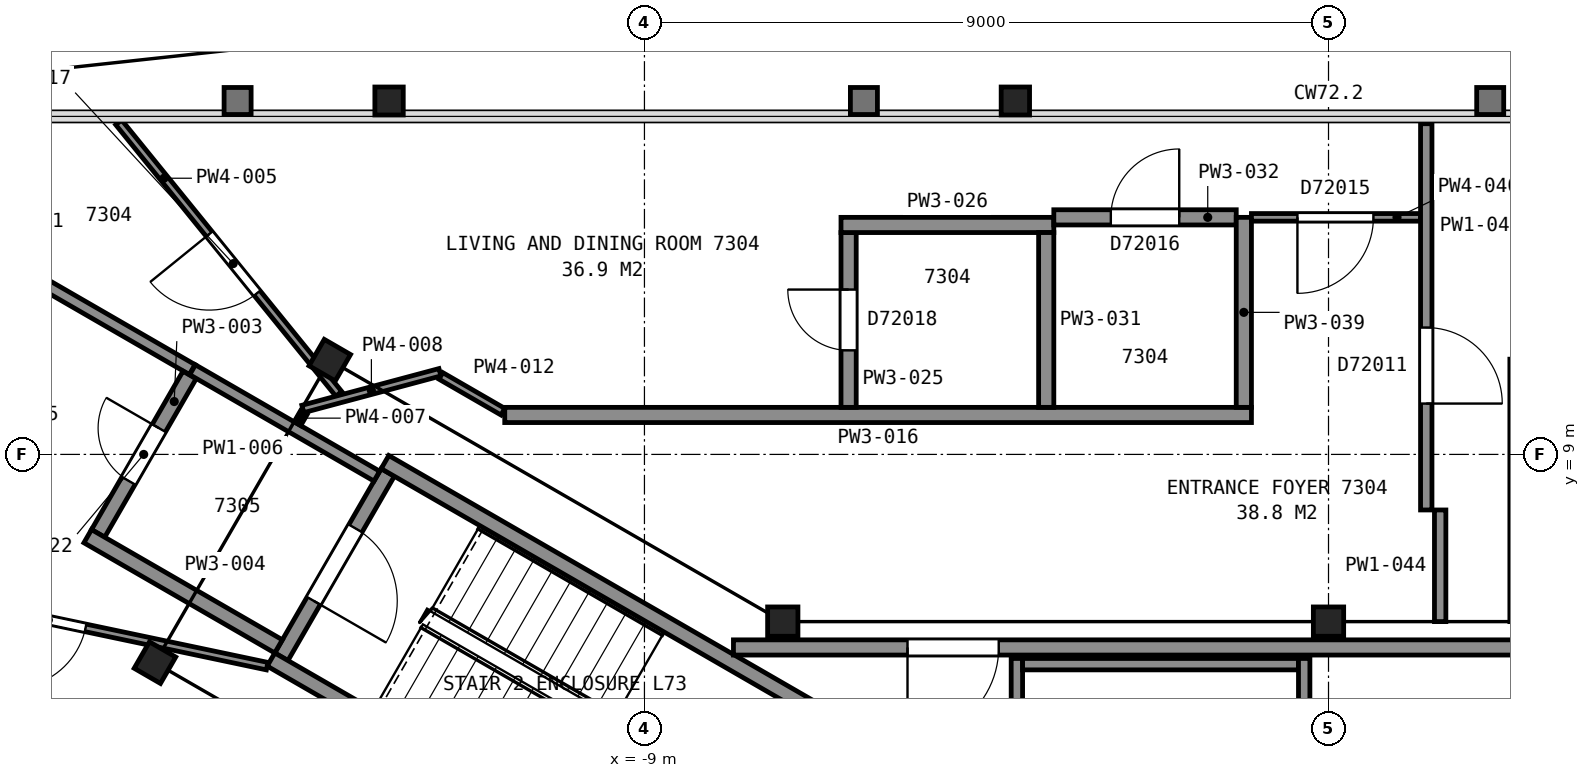
"""IFC4 building model, lengths in metres.
Left out: names, types, materials, properties, quantities, classifications, styles, units other than length and angle.
Written with IfcOpenShell. Run it as: python <this file> out.ifc"""

import sys

from ifc_helpers import new_model, si_unit, direction, frame, frame_2d, origin, origin_2d, place, context, subcontext, project, spatial, rectangle, i_section, extrude, element, fill, save


model = new_model("IFC4")
c1 = context("Model", 3, precision=1e-05, world=origin(), true_north=direction((0.0, 1.0)))
c2 = subcontext(c1, "Body", "Model", "MODEL_VIEW")
j1 = project(units=[si_unit("LENGTHUNIT", "METRE"), si_unit("PLANEANGLEUNIT", "RADIAN")], contexts=[c1])
p1 = place(None, origin())
s1 = spatial("IfcSite", under=j1, at=p1, CompositionType="ELEMENT")
p2 = place(p1, origin())
s2 = spatial("IfcBuilding", under=s1, at=p2, CompositionType="ELEMENT")
p3 = place(p2, frame((0.0, 0.0, 289.9)))
s3 = spatial("IfcBuildingStorey", under=s2, at=p3, CompositionType="ELEMENT", Elevation=289.9)
for number, where, z_axis, x_axis in (
    (1, (-4.12, 13.65, 0.0), (0.0, 0.0, 1.0), (1.0, 0.0, 0.0)),
    (2, (-12.36, 13.65, 0.0), (0.0, 0.0, 1.0), (1.0, 0.0, 0.0)),
):
    element("IfcColumn", number, at=place(p3, frame(where, z_axis=z_axis, x_axis=x_axis)), inside=s3, PredefinedType="COLUMN", context=c2, shape_type="SweptSolid", body=[
        extrude(i_section(OverallWidth=0.373, OverallDepth=0.368, WebThickness=0.015, FlangeThickness=0.024, FilletRadius=0.015, at=origin_2d()), origin(), (0.0, 0.0, 1.0), 3.7),
    ])
for number, where, z_axis, x_axis in (
    (3, (0.0, 6.8, 0.0), (0.0, 0.0, 1.0), (1.0, 0.0, 0.0)),
    (4, (-7.18, 6.8, 0.0), (0.0, 0.0, 1.0), (1.0, 0.0, 0.0)),
):
    element("IfcColumn", number, at=place(p3, frame(where, z_axis=z_axis, x_axis=x_axis)), inside=s3, PredefinedType="COLUMN", context=c2, shape_type="SweptSolid", body=[
        extrude(i_section(OverallWidth=0.399, OverallDepth=0.386, WebThickness=0.021, FlangeThickness=0.033, FilletRadius=0.015, at=origin_2d()), origin(), (0.0, 0.0, 1.0), 3.7),
    ])
for number, where, z_axis, x_axis in (
    (5, (-13.14, 10.24, 0.0), (0.0, 0.0, 1.0), (0.5, 0.866, 0.0)),
    (6, (-15.44, 6.26, 0.0), (0.0, 0.0, 1.0), (0.5, 0.866, 0.0)),
):
    element("IfcColumn", number, at=place(p3, frame(where, z_axis=z_axis, x_axis=x_axis)), inside=s3, PredefinedType="COLUMN", context=c2, shape_type="SweptSolid", body=[
        extrude(i_section(OverallWidth=0.401, OverallDepth=0.399, WebThickness=0.025, FlangeThickness=0.04, FilletRadius=0.015, at=origin_2d()), origin(), (0.0, 0.0, 1.0), 3.7),
    ])
p4 = place(p3, frame((-12.377, 8.762, 0.0), z_axis=(0.0, 0.0, 1.0), x_axis=(-0.500049511043, -0.865996816683, 0.0)))
e7 = element("IfcWall", 7, at=p4, inside=s3, PredefinedType="PARTITIONING", context=c2, shape_type="SweptSolid", body=[
    extrude(rectangle(XDim=2.8, YDim=0.2, at=frame_2d((1.4, 0.0))), origin(), (0.0, 0.0, 1.0), 3.45),
])
p5 = place(p4, frame((0.85, 0.0, 0.0)))
e8 = element("IfcOpeningElement", 8, at=p5, cuts=e7, PredefinedType="OPENING", context=c2, shape_type="SweptSolid", body=[
    extrude(rectangle(XDim=1.1, YDim=2.1, at=frame_2d((0.55, 1.05))), frame((0.0, 0.11, 0.0), z_axis=(0.0, -1.0, 0.0), x_axis=(1.0, 0.0, 0.0)), (0.0, 0.0, 1.0), 0.22),
])
for number, where, z_axis, x_axis in (
    (9, (-7.678, 2.701, 0.0), (0.0, 0.0, 1.0), (-0.866, 0.5, 0.0)),
    (10, (-6.178, 5.299, 0.0), (0.0, 0.0, 1.0), (-0.866, 0.5, 0.0)),
):
    element("IfcWall", number, at=place(p3, frame(where, z_axis=z_axis, x_axis=x_axis)), inside=s3, PredefinedType="PARTITIONING", context=c2, shape_type="SweptSolid", body=[
        extrude(rectangle(XDim=7.2, YDim=0.2, at=frame_2d((3.6, 0.0))), origin(), (0.0, 0.0, 1.0), 3.45),
    ])
p6 = place(p3, frame((7.829, 6.46, 0.0), z_axis=(0.0, 0.0, 1.0), x_axis=(-1.0, 0.0, 0.0)))
e11 = element("IfcWall", 11, at=p6, inside=s3, PredefinedType="PARTITIONING", context=c2, shape_type="SweptSolid", body=[
    extrude(rectangle(XDim=15.658, YDim=0.2, at=frame_2d((7.829, 0.0))), origin(), (0.0, 0.0, 1.0), 3.45),
])
p7 = place(p6, frame((12.168, 0.0, 0.0)))
e12 = element("IfcOpeningElement", 12, at=p7, cuts=e11, PredefinedType="OPENING", context=c2, shape_type="SweptSolid", body=[
    extrude(rectangle(XDim=1.2, YDim=2.1, at=frame_2d((0.6, 1.05))), frame((0.0, 0.11, 0.0), z_axis=(0.0, -1.0, 0.0), x_axis=(1.0, 0.0, 0.0)), (0.0, 0.0, 1.0), 0.22),
])
p8 = place(p3, frame((-4.1, 2.085, 0.0), z_axis=(0.0, 0.0, 1.0), x_axis=(0.0, 1.0, 0.0)))
e13 = element("IfcWall", 13, at=p8, inside=s3, PredefinedType="PARTITIONING", context=c2, shape_type="SweptSolid", body=[
    extrude(rectangle(XDim=4.23, YDim=0.15, at=frame_2d((2.115, 0.0))), origin(), (0.0, 0.0, 1.0), 3.45),
])
p9 = place(p8, frame((1.625, 0.0, 0.0)))
e14 = element("IfcOpeningElement", 14, at=p9, cuts=e13, PredefinedType="OPENING", context=c2, shape_type="SweptSolid", body=[
    extrude(rectangle(XDim=1.0, YDim=2.1, at=frame_2d((0.5, 1.05))), frame((0.0, 0.085, 0.0), z_axis=(0.0, -1.0, 0.0), x_axis=(1.0, 0.0, 0.0)), (0.0, 0.0, 1.0), 0.17),
])
p10 = place(p3, frame((-4.025, 6.24, 0.0), z_axis=(0.0, 0.0, 1.0), x_axis=(1.0, 0.0, 0.0)))
e15 = element("IfcWall", 15, at=p10, inside=s3, PredefinedType="PARTITIONING", context=c2, shape_type="SweptSolid", body=[
    extrude(rectangle(XDim=3.63, YDim=0.15, at=frame_2d((1.815, 0.0))), origin(), (0.0, 0.0, 1.0), 3.45),
])
p11 = place(p3, frame((-0.32, 2.252, 0.0), z_axis=(0.0, 0.0, 1.0), x_axis=(0.0, 1.0, 0.0)))
e16 = element("IfcWall", 16, at=p11, inside=s3, PredefinedType="PARTITIONING", context=c2, shape_type="SweptSolid", body=[
    extrude(rectangle(XDim=4.063, YDim=0.15, at=frame_2d((2.031, 0.0))), origin(), (0.0, 0.0, 1.0), 3.45),
])
p12 = place(p3, frame((-20.506, 13.324, 0.0), z_axis=(0.0, 0.0, 1.0), x_axis=(0.866004971522, -0.500035388047, 0.0)))
e17 = element("IfcWall", 17, at=p12, inside=s3, PredefinedType="PARTITIONING", context=c2, shape_type="SweptSolid", body=[
    extrude(rectangle(XDim=6.416, YDim=0.15, at=frame_2d((3.208, 0.0))), origin(), (0.0, 0.0, 1.0), 2.723),
])
p13 = place(p3, frame((-19.729, 7.428, 0.0), z_axis=(0.0, 0.0, 1.0), x_axis=(0.97852427483, -0.206131617102, 0.0)))
e18 = element("IfcWall", 18, at=p13, inside=s3, PredefinedType="PARTITIONING", context=c2, shape_type="SweptSolid", body=[
    extrude(rectangle(XDim=5.891, YDim=0.1, at=frame_2d((2.946, 0.0))), origin(), (0.0, 0.0, 1.0), 2.723),
])
p14 = place(p13, frame((2.45, 0.0, 0.0)))
e19 = element("IfcOpeningElement", 19, at=p14, cuts=e18, PredefinedType="OPENING", context=c2, shape_type="SweptSolid", body=[
    extrude(rectangle(XDim=1.0, YDim=2.1, at=frame_2d((0.5, 1.05))), frame((0.0, 0.06, 0.0), z_axis=(0.0, -1.0, 0.0), x_axis=(1.0, 0.0, 0.0)), (0.0, 0.0, 1.0), 0.12),
])
p15 = place(p3, frame((-14.985, 10.045, 0.0), z_axis=(0.0, 0.0, 1.0), x_axis=(-0.499903970786, -0.866080839178, 0.0)))
e20 = element("IfcWall", 20, at=p15, inside=s3, PredefinedType="PARTITIONING", context=c2, shape_type="SweptSolid", body=[
    extrude(rectangle(XDim=2.406, YDim=0.2, at=frame_2d((1.203, 0.0))), origin(), (0.0, 0.0, 1.0), 2.723),
])
p16 = place(p15, frame((0.806, 0.0, 0.0)))
e21 = element("IfcOpeningElement", 21, at=p16, cuts=e20, PredefinedType="OPENING", context=c2, shape_type="SweptSolid", body=[
    extrude(rectangle(XDim=0.8, YDim=2.1, at=frame_2d((0.4, 1.05))), frame((0.0, 0.11, 0.0), z_axis=(0.0, -1.0, 0.0), x_axis=(1.0, 0.0, 0.0)), (0.0, 0.0, 1.0), 0.22),
])
p17 = place(p3, frame((-16.325, 7.924, 0.0), z_axis=(0.0, 0.0, 1.0), x_axis=(0.865969617579, -0.500096612097, 0.0)))
e22 = element("IfcWall", 22, at=p17, inside=s3, PredefinedType="PARTITIONING", context=c2, shape_type="SweptSolid", body=[
    extrude(rectangle(XDim=2.899, YDim=0.2, at=frame_2d((1.45, 0.0))), origin(), (0.0, 0.0, 1.0), 2.723),
])
p18 = place(p3, frame((-13.021, 9.797, 0.0), z_axis=(0.0, 0.0, 1.0), x_axis=(-0.629738754572, 0.776806990822, 0.0)))
e23 = element("IfcWall", 23, at=p18, inside=s3, PredefinedType="PARTITIONING", context=c2, shape_type="SweptSolid", body=[
    extrude(rectangle(XDim=4.598, YDim=0.1, at=frame_2d((2.299, 0.0))), origin(), (0.0, 0.0, 1.0), 2.723),
])
p19 = place(p18, frame((1.706, 0.0, 0.0)))
e24 = element("IfcOpeningElement", 24, at=p19, cuts=e23, PredefinedType="OPENING", context=c2, shape_type="SweptSolid", body=[
    extrude(rectangle(XDim=1.0, YDim=2.1, at=frame_2d((0.5, 1.05))), frame((0.0, 0.06, 0.0), z_axis=(0.0, -1.0, 0.0), x_axis=(1.0, 0.0, 0.0)), (0.0, 0.0, 1.0), 0.12),
])
p20 = place(p3, frame((-14.945, 10.114, 0.0), z_axis=(0.0, 0.0, 1.0), x_axis=(0.865969158485, -0.500097407065, 0.0)))
e25 = element("IfcWall", 25, at=p20, inside=s3, PredefinedType="PARTITIONING", context=c2, shape_type="SweptSolid", body=[
    extrude(rectangle(XDim=2.799, YDim=0.15, at=frame_2d((1.4, 0.0))), origin(), (0.0, 0.0, 1.0), 2.723),
])
p21 = place(p3, frame((-13.565, 9.404, 0.0), z_axis=(0.0, 0.0, 1.0), x_axis=(0.500181256421, 0.865920730047, 0.0)))
e26 = element("IfcWall", 26, at=p21, inside=s3, PredefinedType="PARTITIONING", context=c2, shape_type="SweptSolid", body=[
    extrude(rectangle(XDim=0.169, YDim=0.1, at=frame_2d((0.084, 0.0))), origin(), (0.0, 0.0, 1.0), 2.723),
])
p22 = place(p3, frame((-13.494, 9.598, 0.0), z_axis=(0.0, 0.0, 1.0), x_axis=(0.96601104623, 0.258500790254, 0.0)))
e27 = element("IfcWall", 27, at=p22, inside=s3, PredefinedType="PARTITIONING", context=c2, shape_type="SweptSolid", body=[
    extrude(rectangle(XDim=1.867, YDim=0.1, at=frame_2d((0.934, 0.0))), origin(), (0.0, 0.0, 1.0), 2.723),
])
p23 = place(p3, frame((-11.678, 10.033, 0.0), z_axis=(0.0, 0.0, 1.0), x_axis=(0.866116627388, -0.499841962787, 0.0)))
e28 = element("IfcWall", 28, at=p23, inside=s3, PredefinedType="PARTITIONING", context=c2, shape_type="SweptSolid", body=[
    extrude(rectangle(XDim=0.943, YDim=0.1, at=frame_2d((0.472, 0.0))), origin(), (0.0, 0.0, 1.0), 2.723),
])
p24 = place(p3, frame((-10.838, 9.519, 0.0), z_axis=(0.0, 0.0, 1.0), x_axis=(1.0, 0.0, 0.0)))
e29 = element("IfcWall", 29, at=p24, inside=s3, PredefinedType="PARTITIONING", context=c2, shape_type="SweptSolid", body=[
    extrude(rectangle(XDim=9.824, YDim=0.2, at=frame_2d((4.912, 0.0))), origin(), (0.0, 0.0, 1.0), 2.723),
])
p25 = place(p3, frame((-6.314, 11.919, 0.0), z_axis=(0.0, 0.0, 1.0), x_axis=(0.0, -1.0, 0.0)))
e30 = element("IfcWall", 30, at=p25, inside=s3, PredefinedType="PARTITIONING", context=c2, shape_type="SweptSolid", body=[
    extrude(rectangle(XDim=2.3, YDim=0.2, at=frame_2d((1.15, 0.0))), origin(), (0.0, 0.0, 1.0), 2.723),
])
p26 = place(p25, frame((0.75, 0.0, 0.0)))
e31 = element("IfcOpeningElement", 31, at=p26, cuts=e30, PredefinedType="OPENING", context=c2, shape_type="SweptSolid", body=[
    extrude(rectangle(XDim=0.8, YDim=2.1, at=frame_2d((0.4, 1.05))), frame((0.0, 0.11, 0.0), z_axis=(0.0, -1.0, 0.0), x_axis=(1.0, 0.0, 0.0)), (0.0, 0.0, 1.0), 0.22),
])
p27 = place(p3, frame((-6.414, 12.019, 0.0), z_axis=(0.0, 0.0, 1.0), x_axis=(1.0, 0.0, 0.0)))
e32 = element("IfcWall", 32, at=p27, inside=s3, PredefinedType="PARTITIONING", context=c2, shape_type="SweptSolid", body=[
    extrude(rectangle(XDim=2.8, YDim=0.2, at=frame_2d((1.4, 0.0))), origin(), (0.0, 0.0, 1.0), 2.723),
])
p28 = place(p3, frame((-3.714, 9.619, 0.0), z_axis=(0.0, 0.0, 1.0), x_axis=(0.0, 1.0, 0.0)))
e33 = element("IfcWall", 33, at=p28, inside=s3, PredefinedType="PARTITIONING", context=c2, shape_type="SweptSolid", body=[
    extrude(rectangle(XDim=2.3, YDim=0.2, at=frame_2d((1.15, 0.0))), origin(), (0.0, 0.0, 1.0), 2.723),
])
p29 = place(p3, frame((-1.214, 12.119, 0.0), z_axis=(0.0, 0.0, 1.0), x_axis=(-1.0, 0.0, 0.0)))
e34 = element("IfcWall", 34, at=p29, inside=s3, PredefinedType="PARTITIONING", context=c2, shape_type="SweptSolid", body=[
    extrude(rectangle(XDim=2.4, YDim=0.2, at=frame_2d((1.2, 0.0))), origin(), (0.0, 0.0, 1.0), 2.723),
])
p30 = place(p29, frame((0.75, 0.0, 0.0)))
e35 = element("IfcOpeningElement", 35, at=p30, cuts=e34, PredefinedType="OPENING", context=c2, shape_type="SweptSolid", body=[
    extrude(rectangle(XDim=0.9, YDim=2.1, at=frame_2d((0.45, 1.05))), frame((0.0, 0.11, 0.0), z_axis=(0.0, -1.0, 0.0), x_axis=(1.0, 0.0, 0.0)), (0.0, 0.0, 1.0), 0.22),
])
p31 = place(p3, frame((-1.114, 9.619, 0.0), z_axis=(0.0, 0.0, 1.0), x_axis=(0.0, 1.0, 0.0)))
e36 = element("IfcWall", 36, at=p31, inside=s3, PredefinedType="PARTITIONING", context=c2, shape_type="SweptSolid", body=[
    extrude(rectangle(XDim=2.5, YDim=0.2, at=frame_2d((1.25, 0.0))), origin(), (0.0, 0.0, 1.0), 2.723),
])
p32 = place(p3, frame((-1.014, 12.119, 0.0), z_axis=(0.0, 0.0, 1.0), x_axis=(1.0, 0.0, 0.0)))
e37 = element("IfcWall", 37, at=p32, inside=s3, PredefinedType="PARTITIONING", context=c2, shape_type="SweptSolid", body=[
    extrude(rectangle(XDim=2.225, YDim=0.1, at=frame_2d((1.112, 0.0))), origin(), (0.0, 0.0, 1.0), 2.723),
])
p33 = place(p32, frame((0.605, 0.0, 0.0)))
e38 = element("IfcOpeningElement", 38, at=p33, cuts=e37, PredefinedType="OPENING", context=c2, shape_type="SweptSolid", body=[
    extrude(rectangle(XDim=1.0, YDim=2.1, at=frame_2d((0.5, 1.05))), frame((0.0, 0.06, 0.0), z_axis=(0.0, -1.0, 0.0), x_axis=(1.0, 0.0, 0.0)), (0.0, 0.0, 1.0), 0.12),
])
p34 = place(p3, frame((1.286, 13.351, 0.0), z_axis=(0.0, 0.0, 1.0), x_axis=(0.0, -1.0, 0.0)))
e39 = element("IfcWall", 39, at=p34, inside=s3, PredefinedType="PARTITIONING", context=c2, shape_type="SweptSolid", body=[
    extrude(rectangle(XDim=5.082, YDim=0.15, at=frame_2d((2.541, 0.0))), origin(), (0.0, 0.0, 1.0), 2.723),
])
p35 = place(p34, frame((2.682, 0.0, 0.0)))
e40 = element("IfcOpeningElement", 40, at=p35, cuts=e39, PredefinedType="OPENING", context=c2, shape_type="SweptSolid", body=[
    extrude(rectangle(XDim=1.0, YDim=2.1, at=frame_2d((0.5, 1.05))), frame((0.0, 0.085, 0.0), z_axis=(0.0, -1.0, 0.0), x_axis=(1.0, 0.0, 0.0)), (0.0, 0.0, 1.0), 0.17),
])
p36 = place(p3, frame((1.469, 6.8, 0.0), z_axis=(0.0, 0.0, 1.0), x_axis=(0.0, 1.0, 0.0)))
e41 = element("IfcWall", 41, at=p36, inside=s3, PredefinedType="PARTITIONING", context=c2, shape_type="SweptSolid", body=[
    extrude(rectangle(XDim=1.469, YDim=0.15, at=frame_2d((0.734, 0.0))), origin(), (0.0, 0.0, 1.0), 2.723),
])
p37 = place(p3, frame((2.486, 6.8, 0.0), z_axis=(0.0, 0.0, 1.0), x_axis=(0.0, 1.0, 0.0)))
e42 = element("IfcWall", 42, at=p37, inside=s3, PredefinedType="PARTITIONING", context=c2, shape_type="SweptSolid", body=[
    extrude(rectangle(XDim=3.453, YDim=0.2, at=frame_2d((1.727, 0.0))), origin(), (0.0, 0.0, 1.0), 2.723),
])
p38 = place(p5, origin())
e43 = element("IfcDoor", 43, at=p38, inside=s3, OperationType="SINGLE_SWING_RIGHT", PredefinedType="DOOR", context=c2, shape_type="SweptSolid", body=[
    extrude(rectangle(XDim=1.1, YDim=2.1, at=frame_2d((0.55, 1.05))), frame((0.0, 0.025, 0.0), z_axis=(0.0, -1.0, 0.0), x_axis=(1.0, 0.0, 0.0)), (0.0, 0.0, 1.0), 0.05),
])
fill(e8, e43)
p39 = place(p7, origin())
e44 = element("IfcDoor", 44, at=p39, inside=s3, OperationType="SINGLE_SWING_RIGHT", PredefinedType="DOOR", context=c2, shape_type="SweptSolid", body=[
    extrude(rectangle(XDim=1.2, YDim=2.1, at=frame_2d((0.6, 1.05))), frame((0.0, 0.025, 0.0), z_axis=(0.0, -1.0, 0.0), x_axis=(1.0, 0.0, 0.0)), (0.0, 0.0, 1.0), 0.05),
])
fill(e12, e44)
p40 = place(p14, origin())
e45 = element("IfcDoor", 45, at=p40, inside=s3, OperationType="SINGLE_SWING_LEFT", PredefinedType="DOOR", context=c2, shape_type="SweptSolid", body=[
    extrude(rectangle(XDim=1.0, YDim=2.1, at=frame_2d((0.5, 1.05))), frame((0.0, 0.025, 0.0), z_axis=(0.0, -1.0, 0.0), x_axis=(1.0, 0.0, 0.0)), (0.0, 0.0, 1.0), 0.05),
])
fill(e19, e45)
p41 = place(p16, origin())
e46 = element("IfcDoor", 46, at=p41, inside=s3, OperationType="SINGLE_SWING_LEFT", PredefinedType="DOOR", context=c2, shape_type="SweptSolid", body=[
    extrude(rectangle(XDim=0.8, YDim=2.1, at=frame_2d((0.4, 1.05))), frame((0.0, 0.025, 0.0), z_axis=(0.0, -1.0, 0.0), x_axis=(1.0, 0.0, 0.0)), (0.0, 0.0, 1.0), 0.05),
])
fill(e21, e46)
p42 = place(p19, origin())
e47 = element("IfcDoor", 47, at=p42, inside=s3, OperationType="SINGLE_SWING_RIGHT", PredefinedType="DOOR", context=c2, shape_type="SweptSolid", body=[
    extrude(rectangle(XDim=1.0, YDim=2.1, at=frame_2d((0.5, 1.05))), frame((0.0, 0.025, 0.0), z_axis=(0.0, -1.0, 0.0), x_axis=(1.0, 0.0, 0.0)), (0.0, 0.0, 1.0), 0.05),
])
fill(e24, e47)
p43 = place(p26, origin())
e48 = element("IfcDoor", 48, at=p43, inside=s3, OperationType="SINGLE_SWING_LEFT", PredefinedType="DOOR", context=c2, shape_type="SweptSolid", body=[
    extrude(rectangle(XDim=0.8, YDim=2.1, at=frame_2d((0.4, 1.05))), frame((0.0, 0.025, 0.0), z_axis=(0.0, -1.0, 0.0), x_axis=(1.0, 0.0, 0.0)), (0.0, 0.0, 1.0), 0.05),
])
fill(e31, e48)
p44 = place(p30, origin())
e49 = element("IfcDoor", 49, at=p44, inside=s3, OperationType="SINGLE_SWING_LEFT", PredefinedType="DOOR", context=c2, shape_type="SweptSolid", body=[
    extrude(rectangle(XDim=0.9, YDim=2.1, at=frame_2d((0.45, 1.05))), frame((0.0, 0.025, 0.0), z_axis=(0.0, -1.0, 0.0), x_axis=(1.0, 0.0, 0.0)), (0.0, 0.0, 1.0), 0.05),
])
fill(e35, e49)
p45 = place(p33, origin())
e50 = element("IfcDoor", 50, at=p45, inside=s3, OperationType="SINGLE_SWING_LEFT", PredefinedType="DOOR", context=c2, shape_type="SweptSolid", body=[
    extrude(rectangle(XDim=1.0, YDim=2.1, at=frame_2d((0.5, 1.05))), frame((0.0, 0.025, 0.0), z_axis=(0.0, -1.0, 0.0), x_axis=(1.0, 0.0, 0.0)), (0.0, 0.0, 1.0), 0.05),
])
fill(e38, e50)
p46 = place(p35, origin())
e51 = element("IfcDoor", 51, at=p46, inside=s3, OperationType="SINGLE_SWING_RIGHT", PredefinedType="DOOR", context=c2, shape_type="SweptSolid", body=[
    extrude(rectangle(XDim=1.0, YDim=2.1, at=frame_2d((0.5, 1.05))), frame((0.0, 0.025, 0.0), z_axis=(0.0, -1.0, 0.0), x_axis=(1.0, 0.0, 0.0)), (0.0, 0.0, 1.0), 0.05),
])
fill(e40, e51)
save(model, sys.argv[1])
